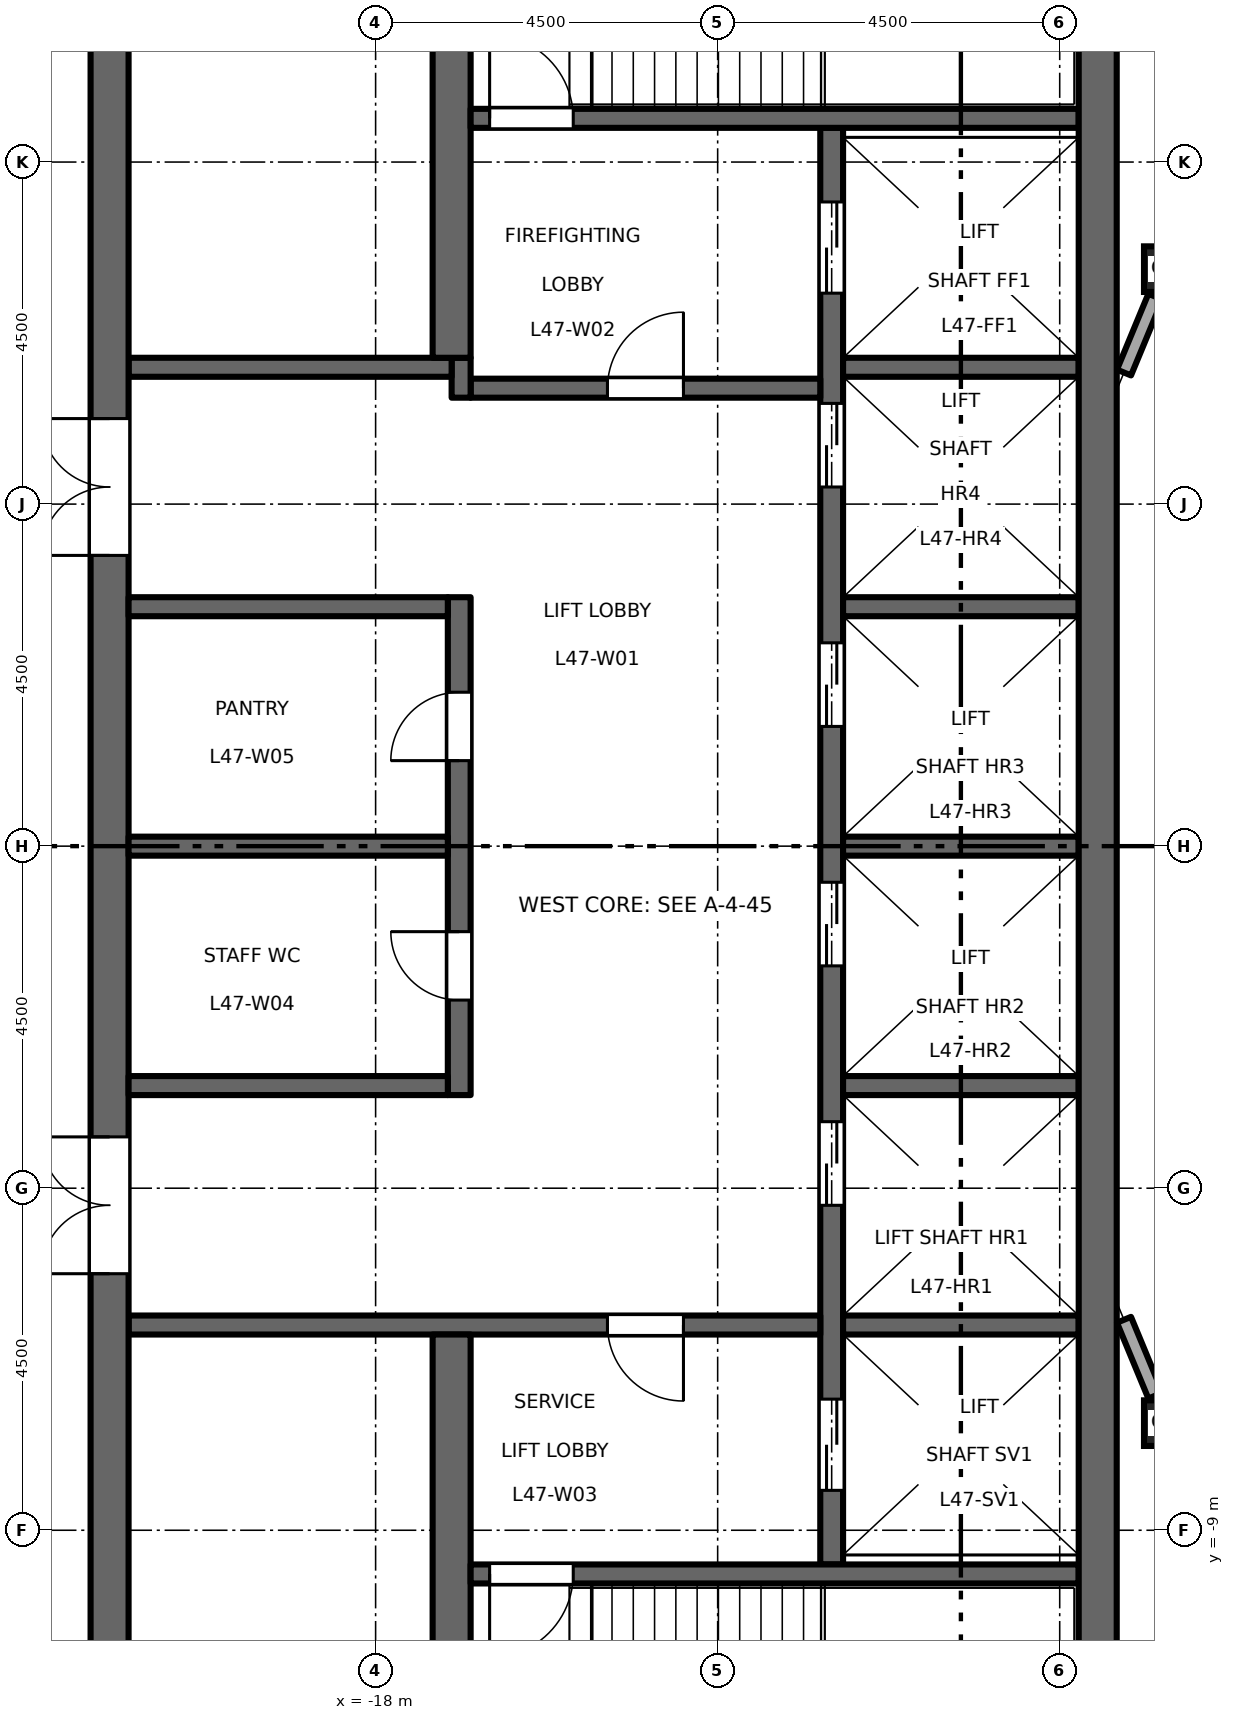
"""IFC4 building model, lengths in metres.
Left out: names, types, materials, properties, quantities, classifications, styles, units other than length and angle.
Written with IfcOpenShell. Run it as: python <this file> out.ifc"""

import sys

from ifc_helpers import new_model, si_unit, direction, frame, frame_2d, origin, origin_2d, place, context, subcontext, project, spatial, rectangle, hollow_rectangle, extrude, element, fill, save


model = new_model("IFC4")
c1 = context("Model", 3, precision=1e-05, world=origin(), true_north=direction((0.0, 1.0)))
c2 = subcontext(c1, "Body", "Model", "MODEL_VIEW")
j1 = project(units=[si_unit("LENGTHUNIT", "METRE"), si_unit("PLANEANGLEUNIT", "RADIAN")], contexts=[c1])
p1 = place(None, origin())
s1 = spatial("IfcSite", under=j1, at=p1, CompositionType="ELEMENT")
p2 = place(p1, origin())
s2 = spatial("IfcBuilding", under=s1, at=p2, CompositionType="ELEMENT")
p3 = place(p2, frame((0.0, 0.0, 219.7)))
s3 = spatial("IfcBuildingStorey", under=s2, at=p3, CompositionType="ELEMENT", Elevation=219.7)
for number, where, z_axis, x_axis in (
    (1, (-7.591, -7.591, 0.0), (0.0, 0.0, 1.0), (1.0, 0.0, 0.0)),
    (2, (-7.591, 7.591, 0.0), (0.0, 0.0, 1.0), (1.0, 0.0, 0.0)),
):
    element("IfcColumn", number, at=place(p3, frame(where, z_axis=z_axis, x_axis=x_axis)), inside=s3, PredefinedType="COLUMN", context=c2, shape_type="SweptSolid", body=[
        extrude(hollow_rectangle(XDim=0.6, YDim=0.6, WallThickness=0.032, at=origin_2d()), origin(), (0.0, 0.0, 1.0), 4.5),
    ])
p4 = place(p3, frame((-12.0, -9.45, 0.0), z_axis=(0.0, 0.0, 1.0), x_axis=(0.0, 1.0, 0.0)))
e3 = element("IfcWall", 3, at=p4, inside=s3, PredefinedType="SHEAR", context=c2, shape_type="SweptSolid", body=[
    extrude(rectangle(XDim=18.9, YDim=0.3, at=frame_2d((9.45, 0.0))), origin(), (0.0, 0.0, 1.0), 4.35),
])
p5 = place(p4, frame((4.725, 0.0, 0.0)))
e4 = element("IfcOpeningElement", 4, at=p5, cuts=e3, PredefinedType="OPENING", context=c2, shape_type="SweptSolid", body=[
    extrude(rectangle(XDim=1.1, YDim=2.1, at=frame_2d((0.55, 1.05))), frame((0.0, 0.16, 0.0), z_axis=(0.0, -1.0, 0.0), x_axis=(1.0, 0.0, 0.0)), (0.0, 0.0, 1.0), 0.32),
])
p6 = place(p4, frame((7.875, 0.0, 0.0)))
e5 = element("IfcOpeningElement", 5, at=p6, cuts=e3, PredefinedType="OPENING", context=c2, shape_type="SweptSolid", body=[
    extrude(rectangle(XDim=1.1, YDim=2.1, at=frame_2d((0.55, 1.05))), frame((0.0, 0.16, 0.0), z_axis=(0.0, -1.0, 0.0), x_axis=(1.0, 0.0, 0.0)), (0.0, 0.0, 1.0), 0.32),
])
p7 = place(p4, frame((11.025, 0.0, 0.0)))
e6 = element("IfcOpeningElement", 6, at=p7, cuts=e3, PredefinedType="OPENING", context=c2, shape_type="SweptSolid", body=[
    extrude(rectangle(XDim=1.1, YDim=2.1, at=frame_2d((0.55, 1.05))), frame((0.0, 0.16, 0.0), z_axis=(0.0, -1.0, 0.0), x_axis=(1.0, 0.0, 0.0)), (0.0, 0.0, 1.0), 0.32),
])
p8 = place(p4, frame((14.175, 0.0, 0.0)))
e7 = element("IfcOpeningElement", 7, at=p8, cuts=e3, PredefinedType="OPENING", context=c2, shape_type="SweptSolid", body=[
    extrude(rectangle(XDim=1.1, YDim=2.1, at=frame_2d((0.55, 1.05))), frame((0.0, 0.16, 0.0), z_axis=(0.0, -1.0, 0.0), x_axis=(1.0, 0.0, 0.0)), (0.0, 0.0, 1.0), 0.32),
])
p9 = place(p4, frame((16.725, 0.0, 0.0)))
e8 = element("IfcOpeningElement", 8, at=p9, cuts=e3, PredefinedType="OPENING", context=c2, shape_type="SweptSolid", body=[
    extrude(rectangle(XDim=1.2, YDim=2.1, at=frame_2d((0.6, 1.05))), frame((0.0, 0.16, 0.0), z_axis=(0.0, -1.0, 0.0), x_axis=(1.0, 0.0, 0.0)), (0.0, 0.0, 1.0), 0.32),
])
p10 = place(p4, frame((0.975, 0.0, 0.0)))
e9 = element("IfcOpeningElement", 9, at=p10, cuts=e3, PredefinedType="OPENING", context=c2, shape_type="SweptSolid", body=[
    extrude(rectangle(XDim=1.2, YDim=2.1, at=frame_2d((0.6, 1.05))), frame((0.0, 0.16, 0.0), z_axis=(0.0, -1.0, 0.0), x_axis=(1.0, 0.0, 0.0)), (0.0, 0.0, 1.0), 0.32),
])
p11 = place(p3, frame((-12.15, 6.025, 0.0), z_axis=(0.0, 0.0, 1.0), x_axis=(-1.0, 0.0, 0.0)))
e10 = element("IfcWall", 10, at=p11, inside=s3, PredefinedType="SHEAR", context=c2, shape_type="SweptSolid", body=[
    extrude(rectangle(XDim=4.6, YDim=0.25, at=frame_2d((2.3, 0.0))), origin(), (0.0, 0.0, 1.0), 4.35),
])
p12 = place(p11, frame((1.8, 0.0, 0.0)))
e11 = element("IfcOpeningElement", 11, at=p12, cuts=e10, PredefinedType="OPENING", context=c2, shape_type="SweptSolid", body=[
    extrude(rectangle(XDim=1.0, YDim=2.1, at=frame_2d((0.5, 1.05))), frame((0.0, 0.135, 0.0), z_axis=(0.0, -1.0, 0.0), x_axis=(1.0, 0.0, 0.0)), (0.0, 0.0, 1.0), 0.27),
])
p13 = place(p3, frame((-16.875, 5.9, 0.0), z_axis=(0.0, 0.0, 1.0), x_axis=(0.0, 1.0, 0.0)))
e12 = element("IfcWall", 12, at=p13, inside=s3, PredefinedType="SHEAR", context=c2, shape_type="SweptSolid", body=[
    extrude(rectangle(XDim=0.525, YDim=0.25, at=frame_2d((0.263, 0.0))), origin(), (0.0, 0.0, 1.0), 4.35),
])
p14 = place(p3, frame((-17.0, 6.3, 0.0), z_axis=(0.0, 0.0, 1.0), x_axis=(-1.0, 0.0, 0.0)))
e13 = element("IfcWall", 13, at=p14, inside=s3, PredefinedType="SHEAR", context=c2, shape_type="SweptSolid", body=[
    extrude(rectangle(XDim=4.25, YDim=0.25, at=frame_2d((2.125, 0.0))), origin(), (0.0, 0.0, 1.0), 4.35),
])
p15 = place(p3, frame((-12.15, -6.3, 0.0), z_axis=(0.0, 0.0, 1.0), x_axis=(-1.0, 0.0, 0.0)))
e14 = element("IfcWall", 14, at=p15, inside=s3, PredefinedType="SHEAR", context=c2, shape_type="SweptSolid", body=[
    extrude(rectangle(XDim=9.1, YDim=0.25, at=frame_2d((4.55, 0.0))), origin(), (0.0, 0.0, 1.0), 4.35),
])
p16 = place(p15, frame((1.8, 0.0, 0.0)))
e15 = element("IfcOpeningElement", 15, at=p16, cuts=e14, PredefinedType="OPENING", context=c2, shape_type="SweptSolid", body=[
    extrude(rectangle(XDim=1.0, YDim=2.1, at=frame_2d((0.5, 1.05))), frame((0.0, 0.135, 0.0), z_axis=(0.0, -1.0, 0.0), x_axis=(1.0, 0.0, 0.0)), (0.0, 0.0, 1.0), 0.27),
])
p17 = place(p3, frame((-21.5, -13.0, 0.0), z_axis=(0.0, 0.0, 1.0), x_axis=(0.0, 1.0, 0.0)))
e16 = element("IfcWall", 16, at=p17, inside=s3, PredefinedType="SHEAR", context=c2, shape_type="SweptSolid", body=[
    extrude(rectangle(XDim=26.0, YDim=0.5, at=frame_2d((13.0, 0.0))), origin(), (0.0, 0.0, 1.0), 4.35),
])
p18 = place(p17, frame((16.825, 0.0, 0.0)))
e17 = element("IfcOpeningElement", 17, at=p18, cuts=e16, PredefinedType="OPENING", context=c2, shape_type="SweptSolid", body=[
    extrude(rectangle(XDim=1.8, YDim=2.1, at=frame_2d((0.9, 1.05))), frame((0.0, 0.26, 0.0), z_axis=(0.0, -1.0, 0.0), x_axis=(1.0, 0.0, 0.0)), (0.0, 0.0, 1.0), 0.52),
])
p19 = place(p17, frame((7.375, 0.0, 0.0)))
e18 = element("IfcOpeningElement", 18, at=p19, cuts=e16, PredefinedType="OPENING", context=c2, shape_type="SweptSolid", body=[
    extrude(rectangle(XDim=1.8, YDim=2.1, at=frame_2d((0.9, 1.05))), frame((0.0, 0.26, 0.0), z_axis=(0.0, -1.0, 0.0), x_axis=(1.0, 0.0, 0.0)), (0.0, 0.0, 1.0), 0.52),
])
p20 = place(p3, frame((-16.9, -3.275, 0.0), z_axis=(0.0, 0.0, 1.0), x_axis=(0.0, 1.0, 0.0)))
e19 = element("IfcWall", 19, at=p20, inside=s3, PredefinedType="SHEAR", context=c2, shape_type="SweptSolid", body=[
    extrude(rectangle(XDim=6.55, YDim=0.3, at=frame_2d((3.275, 0.0))), origin(), (0.0, 0.0, 1.0), 4.35),
])
p21 = place(p20, frame((1.25, 0.0, 0.0)))
e20 = element("IfcOpeningElement", 20, at=p21, cuts=e19, PredefinedType="OPENING", context=c2, shape_type="SweptSolid", body=[
    extrude(rectangle(XDim=0.9, YDim=2.1, at=frame_2d((0.45, 1.05))), frame((0.0, 0.16, 0.0), z_axis=(0.0, -1.0, 0.0), x_axis=(1.0, 0.0, 0.0)), (0.0, 0.0, 1.0), 0.32),
])
p22 = place(p20, frame((4.4, 0.0, 0.0)))
e21 = element("IfcOpeningElement", 21, at=p22, cuts=e19, PredefinedType="OPENING", context=c2, shape_type="SweptSolid", body=[
    extrude(rectangle(XDim=0.9, YDim=2.1, at=frame_2d((0.45, 1.05))), frame((0.0, 0.16, 0.0), z_axis=(0.0, -1.0, 0.0), x_axis=(1.0, 0.0, 0.0)), (0.0, 0.0, 1.0), 0.32),
])
for number, where, z_axis, x_axis in (
    (22, (-17.05, 0.0, 0.0), (0.0, 0.0, 1.0), (-1.0, 0.0, 0.0)),
    (23, (-17.05, 3.15, 0.0), (0.0, 0.0, 1.0), (-1.0, 0.0, 0.0)),
    (24, (-17.05, -3.15, 0.0), (0.0, 0.0, 1.0), (-1.0, 0.0, 0.0)),
):
    element("IfcWall", number, at=place(p3, frame(where, z_axis=z_axis, x_axis=x_axis)), inside=s3, PredefinedType="SHEAR", context=c2, shape_type="SweptSolid", body=[
        extrude(rectangle(XDim=4.2, YDim=0.25, at=frame_2d((2.1, 0.0))), origin(), (0.0, 0.0, 1.0), 4.35),
    ])
for number, where, z_axis, x_axis in (
    (25, (-17.0, 6.425, 0.0), (0.0, 0.0, 1.0), (0.0, 1.0, 0.0)),
    (26, (-17.0, -13.0, 0.0), (0.0, 0.0, 1.0), (0.0, 1.0, 0.0)),
):
    element("IfcWall", number, at=place(p3, frame(where, z_axis=z_axis, x_axis=x_axis)), inside=s3, PredefinedType="SHEAR", context=c2, shape_type="SweptSolid", body=[
        extrude(rectangle(XDim=6.575, YDim=0.5, at=frame_2d((3.288, 0.0))), origin(), (0.0, 0.0, 1.0), 4.35),
    ])
for number, where, z_axis, x_axis in (
    (27, (-8.75, 0.0, 0.0), (0.0, 0.0, 1.0), (-1.0, 0.0, 0.0)),
    (28, (-8.75, 3.15, 0.0), (0.0, 0.0, 1.0), (-1.0, 0.0, 0.0)),
    (29, (-8.75, 6.3, 0.0), (0.0, 0.0, 1.0), (-1.0, 0.0, 0.0)),
    (30, (-8.75, -3.15, 0.0), (0.0, 0.0, 1.0), (-1.0, 0.0, 0.0)),
    (31, (-8.75, -6.3, 0.0), (0.0, 0.0, 1.0), (-1.0, 0.0, 0.0)),
):
    element("IfcWall", number, at=place(p3, frame(where, z_axis=z_axis, x_axis=x_axis)), inside=s3, PredefinedType="SHEAR", context=c2, shape_type="SweptSolid", body=[
        extrude(rectangle(XDim=3.1, YDim=0.25, at=frame_2d((1.55, 0.0))), origin(), (0.0, 0.0, 1.0), 4.35),
    ])
p23 = place(p3, frame((-8.75, 9.575, 0.0), z_axis=(0.0, 0.0, 1.0), x_axis=(-1.0, 0.0, 0.0)))
e32 = element("IfcWall", 32, at=p23, inside=s3, PredefinedType="SHEAR", context=c2, shape_type="SweptSolid", body=[
    extrude(rectangle(XDim=8.0, YDim=0.25, at=frame_2d((4.0, 0.0))), origin(), (0.0, 0.0, 1.0), 4.35),
])
p24 = place(p23, frame((6.65, 0.0, 0.0)))
e33 = element("IfcOpeningElement", 33, at=p24, cuts=e32, PredefinedType="OPENING", context=c2, shape_type="SweptSolid", body=[
    extrude(rectangle(XDim=1.1, YDim=2.1, at=frame_2d((0.55, 1.05))), frame((0.0, 0.135, 0.0), z_axis=(0.0, -1.0, 0.0), x_axis=(1.0, 0.0, 0.0)), (0.0, 0.0, 1.0), 0.27),
])
p25 = place(p3, frame((-8.75, -9.575, 0.0), z_axis=(0.0, 0.0, 1.0), x_axis=(-1.0, 0.0, 0.0)))
e34 = element("IfcWall", 34, at=p25, inside=s3, PredefinedType="SHEAR", context=c2, shape_type="SweptSolid", body=[
    extrude(rectangle(XDim=8.0, YDim=0.25, at=frame_2d((4.0, 0.0))), origin(), (0.0, 0.0, 1.0), 4.35),
])
p26 = place(p25, frame((6.65, 0.0, 0.0)))
e35 = element("IfcOpeningElement", 35, at=p26, cuts=e34, PredefinedType="OPENING", context=c2, shape_type="SweptSolid", body=[
    extrude(rectangle(XDim=1.1, YDim=2.1, at=frame_2d((0.55, 1.05))), frame((0.0, 0.135, 0.0), z_axis=(0.0, -1.0, 0.0), x_axis=(1.0, 0.0, 0.0)), (0.0, 0.0, 1.0), 0.27),
])
p27 = place(p3, frame((-8.5, -13.0, 0.0), z_axis=(0.0, 0.0, 1.0), x_axis=(0.0, 1.0, 0.0)))
e36 = element("IfcWall", 36, at=p27, inside=s3, PredefinedType="SHEAR", context=c2, shape_type="SweptSolid", body=[
    extrude(rectangle(XDim=26.0, YDim=0.5, at=frame_2d((13.0, 0.0))), origin(), (0.0, 0.0, 1.0), 4.35),
])
for number, where, z_axis, x_axis in (
    (37, (-7.741, 7.229, 0.0), (0.0, 0.0, 1.0), (-0.383, -0.924, 0.0)),
    (38, (-8.154, -6.231, 0.0), (0.0, 0.0, 1.0), (0.383, -0.924, 0.0)),
):
    element("IfcWall", number, at=place(p3, frame(where, z_axis=z_axis, x_axis=x_axis)), inside=s3, PredefinedType="STANDARD", context=c2, shape_type="SweptSolid", body=[
        extrude(rectangle(XDim=1.08, YDim=0.2, at=frame_2d((0.54, 0.0))), origin(), (0.0, 0.0, 1.0), 3.918),
    ])
p28 = place(p12, origin())
e39 = element("IfcDoor", 39, at=p28, inside=s3, OperationType="SINGLE_SWING_LEFT", PredefinedType="DOOR", context=c2, shape_type="SweptSolid", body=[
    extrude(rectangle(XDim=1.0, YDim=2.1, at=frame_2d((0.5, 1.05))), frame((0.0, 0.025, 0.0), z_axis=(0.0, -1.0, 0.0), x_axis=(1.0, 0.0, 0.0)), (0.0, 0.0, 1.0), 0.05),
])
fill(e11, e39)
p29 = place(p16, origin())
e40 = element("IfcDoor", 40, at=p29, inside=s3, OperationType="SINGLE_SWING_RIGHT", PredefinedType="DOOR", context=c2, shape_type="SweptSolid", body=[
    extrude(rectangle(XDim=1.0, YDim=2.1, at=frame_2d((0.5, 1.05))), frame((0.0, 0.025, 0.0), z_axis=(0.0, -1.0, 0.0), x_axis=(1.0, 0.0, 0.0)), (0.0, 0.0, 1.0), 0.05),
])
fill(e15, e40)
p30 = place(p24, origin())
e41 = element("IfcDoor", 41, at=p30, inside=s3, OperationType="SINGLE_SWING_RIGHT", PredefinedType="DOOR", context=c2, shape_type="SweptSolid", body=[
    extrude(rectangle(XDim=1.1, YDim=2.1, at=frame_2d((0.55, 1.05))), frame((0.0, 0.025, 0.0), z_axis=(0.0, -1.0, 0.0), x_axis=(1.0, 0.0, 0.0)), (0.0, 0.0, 1.0), 0.05),
])
fill(e33, e41)
p31 = place(p26, origin())
e42 = element("IfcDoor", 42, at=p31, inside=s3, OperationType="SINGLE_SWING_LEFT", PredefinedType="DOOR", context=c2, shape_type="SweptSolid", body=[
    extrude(rectangle(XDim=1.1, YDim=2.1, at=frame_2d((0.55, 1.05))), frame((0.0, 0.025, 0.0), z_axis=(0.0, -1.0, 0.0), x_axis=(1.0, 0.0, 0.0)), (0.0, 0.0, 1.0), 0.05),
])
fill(e35, e42)
p32 = place(p18, origin())
e43 = element("IfcDoor", 43, at=p32, inside=s3, OperationType="DOUBLE_DOOR_DOUBLE_SWING", PredefinedType="DOOR", context=c2, shape_type="SweptSolid", body=[
    extrude(rectangle(XDim=1.8, YDim=2.1, at=frame_2d((0.9, 1.05))), frame((0.0, 0.025, 0.0), z_axis=(0.0, -1.0, 0.0), x_axis=(1.0, 0.0, 0.0)), (0.0, 0.0, 1.0), 0.05),
])
fill(e17, e43)
p33 = place(p19, origin())
e44 = element("IfcDoor", 44, at=p33, inside=s3, OperationType="DOUBLE_DOOR_DOUBLE_SWING", PredefinedType="DOOR", context=c2, shape_type="SweptSolid", body=[
    extrude(rectangle(XDim=1.8, YDim=2.1, at=frame_2d((0.9, 1.05))), frame((0.0, 0.025, 0.0), z_axis=(0.0, -1.0, 0.0), x_axis=(1.0, 0.0, 0.0)), (0.0, 0.0, 1.0), 0.05),
])
fill(e18, e44)
p34 = place(p5, origin())
e45 = element("IfcDoor", 45, at=p34, inside=s3, OperationType="DOUBLE_DOOR_SLIDING", PredefinedType="DOOR", context=c2, shape_type="SweptSolid", body=[
    extrude(rectangle(XDim=1.1, YDim=2.1, at=frame_2d((0.55, 1.05))), frame((0.0, 0.025, 0.0), z_axis=(0.0, -1.0, 0.0), x_axis=(1.0, 0.0, 0.0)), (0.0, 0.0, 1.0), 0.05),
])
fill(e4, e45)
p35 = place(p6, origin())
e46 = element("IfcDoor", 46, at=p35, inside=s3, OperationType="DOUBLE_DOOR_SLIDING", PredefinedType="DOOR", context=c2, shape_type="SweptSolid", body=[
    extrude(rectangle(XDim=1.1, YDim=2.1, at=frame_2d((0.55, 1.05))), frame((0.0, 0.025, 0.0), z_axis=(0.0, -1.0, 0.0), x_axis=(1.0, 0.0, 0.0)), (0.0, 0.0, 1.0), 0.05),
])
fill(e5, e46)
p36 = place(p7, origin())
e47 = element("IfcDoor", 47, at=p36, inside=s3, OperationType="DOUBLE_DOOR_SLIDING", PredefinedType="DOOR", context=c2, shape_type="SweptSolid", body=[
    extrude(rectangle(XDim=1.1, YDim=2.1, at=frame_2d((0.55, 1.05))), frame((0.0, 0.025, 0.0), z_axis=(0.0, -1.0, 0.0), x_axis=(1.0, 0.0, 0.0)), (0.0, 0.0, 1.0), 0.05),
])
fill(e6, e47)
p37 = place(p8, origin())
e48 = element("IfcDoor", 48, at=p37, inside=s3, OperationType="DOUBLE_DOOR_SLIDING", PredefinedType="DOOR", context=c2, shape_type="SweptSolid", body=[
    extrude(rectangle(XDim=1.1, YDim=2.1, at=frame_2d((0.55, 1.05))), frame((0.0, 0.025, 0.0), z_axis=(0.0, -1.0, 0.0), x_axis=(1.0, 0.0, 0.0)), (0.0, 0.0, 1.0), 0.05),
])
fill(e7, e48)
p38 = place(p9, origin())
e49 = element("IfcDoor", 49, at=p38, inside=s3, OperationType="DOUBLE_DOOR_SLIDING", PredefinedType="DOOR", context=c2, shape_type="SweptSolid", body=[
    extrude(rectangle(XDim=1.2, YDim=2.1, at=frame_2d((0.6, 1.05))), frame((0.0, 0.025, 0.0), z_axis=(0.0, -1.0, 0.0), x_axis=(1.0, 0.0, 0.0)), (0.0, 0.0, 1.0), 0.05),
])
fill(e8, e49)
p39 = place(p10, origin())
e50 = element("IfcDoor", 50, at=p39, inside=s3, OperationType="DOUBLE_DOOR_SLIDING", PredefinedType="DOOR", context=c2, shape_type="SweptSolid", body=[
    extrude(rectangle(XDim=1.2, YDim=2.1, at=frame_2d((0.6, 1.05))), frame((0.0, 0.025, 0.0), z_axis=(0.0, -1.0, 0.0), x_axis=(1.0, 0.0, 0.0)), (0.0, 0.0, 1.0), 0.05),
])
fill(e9, e50)
p40 = place(p21, origin())
e51 = element("IfcDoor", 51, at=p40, inside=s3, OperationType="SINGLE_SWING_LEFT", PredefinedType="DOOR", context=c2, shape_type="SweptSolid", body=[
    extrude(rectangle(XDim=0.9, YDim=2.1, at=frame_2d((0.45, 1.05))), frame((0.0, 0.025, 0.0), z_axis=(0.0, -1.0, 0.0), x_axis=(1.0, 0.0, 0.0)), (0.0, 0.0, 1.0), 0.05),
])
fill(e20, e51)
p41 = place(p22, origin())
e52 = element("IfcDoor", 52, at=p41, inside=s3, OperationType="SINGLE_SWING_RIGHT", PredefinedType="DOOR", context=c2, shape_type="SweptSolid", body=[
    extrude(rectangle(XDim=0.9, YDim=2.1, at=frame_2d((0.45, 1.05))), frame((0.0, 0.025, 0.0), z_axis=(0.0, -1.0, 0.0), x_axis=(1.0, 0.0, 0.0)), (0.0, 0.0, 1.0), 0.05),
])
fill(e21, e52)
save(model, sys.argv[1])
